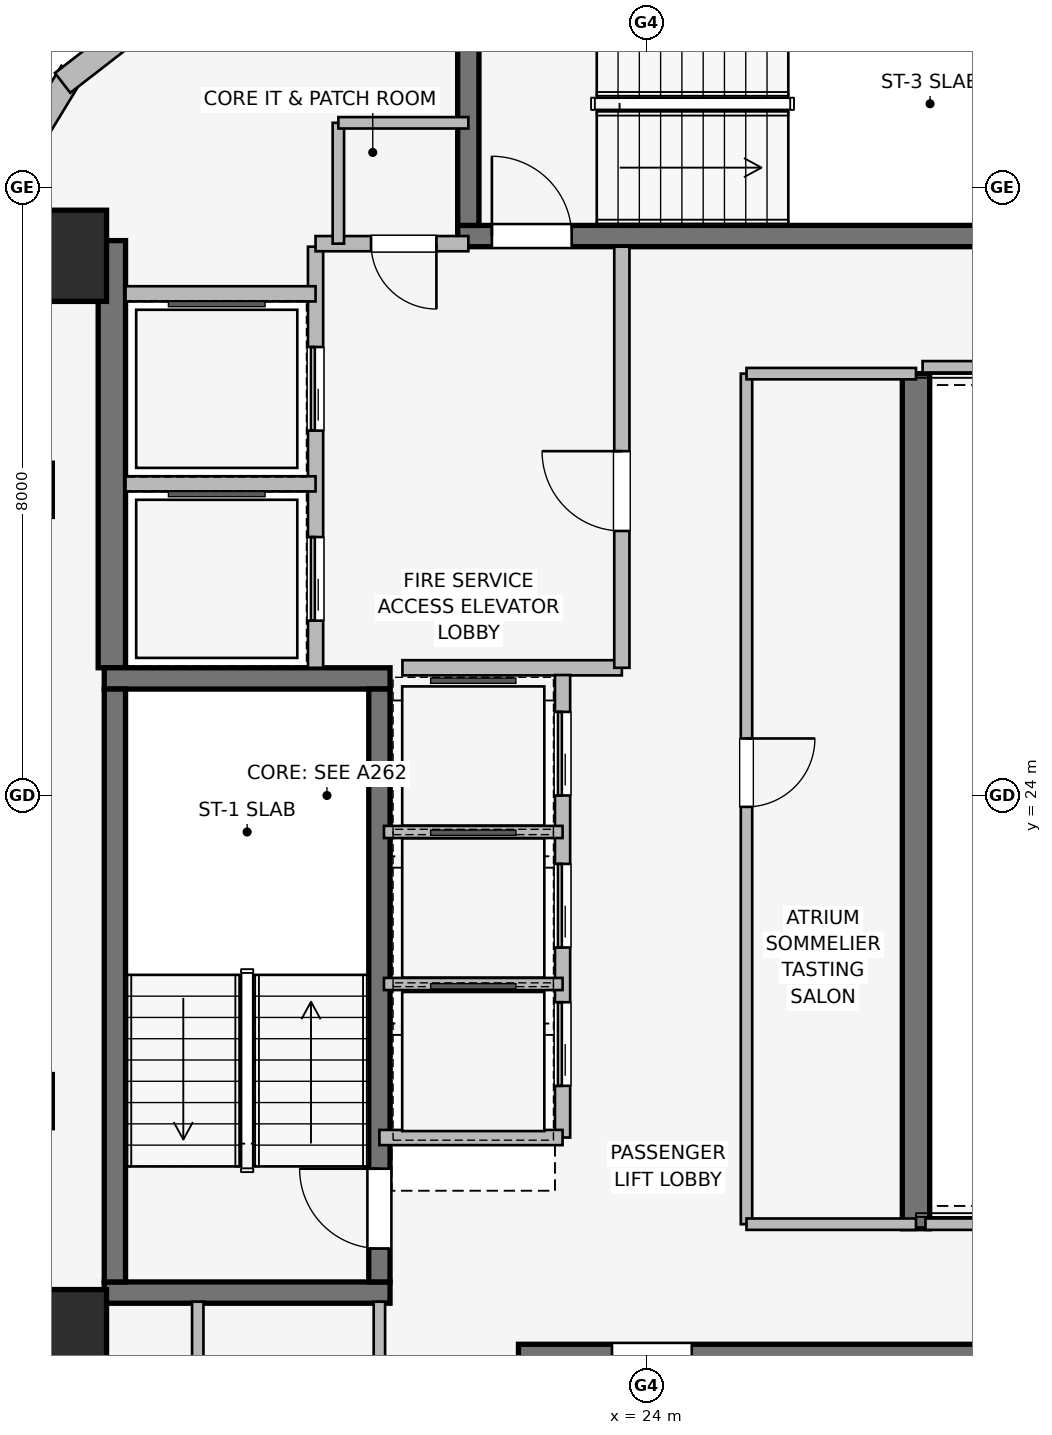
"""IFC4 building model, lengths in metres.
Left out: names, types, materials, properties, quantities, classifications, styles, units other than length and angle.
Written with IfcOpenShell. Run it as: python <this file> out.ifc"""

import sys

from ifc_helpers import new_model, si_unit, direction, frame, frame_2d, origin, origin_2d, place, context, subcontext, project, spatial, rectangle, extrude, element, fill, save


model = new_model("IFC4")
c1 = context("Model", 3, precision=1e-05, world=origin(), true_north=direction((0.0, 1.0)))
c2 = subcontext(c1, "Body", "Model", "MODEL_VIEW")
j1 = project(units=[si_unit("LENGTHUNIT", "METRE"), si_unit("PLANEANGLEUNIT", "RADIAN")], contexts=[c1])
p1 = place(None, origin())
s1 = spatial("IfcSite", under=j1, at=p1, CompositionType="ELEMENT")
p2 = place(p1, origin())
s2 = spatial("IfcBuilding", under=s1, at=p2, CompositionType="ELEMENT")
p3 = place(p2, frame((0.0, 0.0, 220.6)))
s3 = spatial("IfcBuildingStorey", under=s2, at=p3, CompositionType="ELEMENT", Elevation=220.6)
p4 = place(p3, frame((16.97, 25.68, 0.0), z_axis=(0.0, 0.0, 1.0), x_axis=(0.0, 1.0, 0.0)))
e1 = element("IfcWall", 1, at=p4, inside=s3, PredefinedType="SHEAR", context=c2, shape_type="SweptSolid", body=[
    extrude(rectangle(XDim=5.62, YDim=0.36, at=frame_2d((2.81, 0.0))), origin(), (0.0, 0.0, 1.0), 3.55),
])
p5 = place(p3, frame((27.55, 29.55, 0.0), z_axis=(0.0, 0.0, 1.0), x_axis=(0.0, -1.0, 0.0)))
e2 = element("IfcWall", 2, at=p5, inside=s3, PredefinedType="SHEAR", context=c2, shape_type="SweptSolid", body=[
    extrude(rectangle(XDim=11.25, YDim=0.36, at=frame_2d((5.625, 0.0))), origin(), (0.0, 0.0, 1.0), 3.55),
])
for number, where, z_axis, x_axis in (
    (3, (16.87, 17.46, 0.0), (0.0, 0.0, 1.0), (1.0, 0.0, 0.0)),
    (4, (20.63, 25.54, 0.0), (0.0, 0.0, 1.0), (-1.0, 0.0, 0.0)),
):
    element("IfcWall", number, at=place(p3, frame(where, z_axis=z_axis, x_axis=x_axis)), inside=s3, PredefinedType="SHEAR", context=c2, shape_type="SweptSolid", body=[
        extrude(rectangle(XDim=3.76, YDim=0.28, at=frame_2d((1.88, 0.0))), origin(), (0.0, 0.0, 1.0), 3.55),
    ])
p6 = place(p3, frame((17.01, 25.4, 0.0), z_axis=(0.0, 0.0, 1.0), x_axis=(0.0, -1.0, 0.0)))
e5 = element("IfcWall", 5, at=p6, inside=s3, PredefinedType="SHEAR", context=c2, shape_type="SweptSolid", body=[
    extrude(rectangle(XDim=7.8, YDim=0.28, at=frame_2d((3.9, 0.0))), origin(), (0.0, 0.0, 1.0), 3.55),
])
p7 = place(p3, frame((20.49, 17.6, 0.0), z_axis=(0.0, 0.0, 1.0), x_axis=(0.0, 1.0, 0.0)))
e6 = element("IfcWall", 6, at=p7, inside=s3, PredefinedType="SHEAR", context=c2, shape_type="SweptSolid", body=[
    extrude(rectangle(XDim=7.8, YDim=0.28, at=frame_2d((3.9, 0.0))), origin(), (0.0, 0.0, 1.0), 3.55),
])
p8 = place(p7, frame((0.44, 0.0, 0.0)))
e7 = element("IfcOpeningElement", 7, at=p8, cuts=e6, PredefinedType="OPENING", context=c2, shape_type="SweptSolid", body=[
    extrude(rectangle(XDim=1.05, YDim=2.0, at=frame_2d((0.525, 1.0))), frame((0.0, 0.15, 0.0), z_axis=(0.0, -1.0, 0.0), x_axis=(1.0, 0.0, 0.0)), (0.0, 0.0, 1.0), 0.3),
])
p9 = place(p3, frame((30.68, 16.64, 0.0), z_axis=(0.0, 0.0, 1.0), x_axis=(-1.0, 0.0, 0.0)))
e8 = element("IfcWall", 8, at=p9, inside=s3, PredefinedType="SHEAR", context=c2, shape_type="SweptSolid", body=[
    extrude(rectangle(XDim=8.36, YDim=0.28, at=frame_2d((4.18, 0.0))), origin(), (0.0, 0.0, 1.0), 3.55),
])
p10 = place(p9, frame((6.08, 0.0, 0.0)))
e9 = element("IfcOpeningElement", 9, at=p10, cuts=e8, PredefinedType="OPENING", context=c2, shape_type="SweptSolid", body=[
    extrude(rectangle(XDim=1.05, YDim=2.0, at=frame_2d((0.525, 1.0))), frame((0.0, 0.15, 0.0), z_axis=(0.0, -1.0, 0.0), x_axis=(1.0, 0.0, 0.0)), (0.0, 0.0, 1.0), 0.3),
])
p11 = place(p3, frame((21.52, 31.36, 0.0), z_axis=(0.0, 0.0, 1.0), x_axis=(1.0, 0.0, 0.0)))
e10 = element("IfcWall", 10, at=p11, inside=s3, PredefinedType="SHEAR", context=c2, shape_type="SweptSolid", body=[
    extrude(rectangle(XDim=8.36, YDim=0.28, at=frame_2d((4.18, 0.0))), origin(), (0.0, 0.0, 1.0), 3.55),
])
p12 = place(p11, frame((0.45, 0.0, 0.0)))
e11 = element("IfcOpeningElement", 11, at=p12, cuts=e10, PredefinedType="OPENING", context=c2, shape_type="SweptSolid", body=[
    extrude(rectangle(XDim=1.05, YDim=2.0, at=frame_2d((0.525, 1.0))), frame((0.0, 0.15, 0.0), z_axis=(0.0, -1.0, 0.0), x_axis=(1.0, 0.0, 0.0)), (0.0, 0.0, 1.0), 0.3),
])
p13 = place(p3, frame((21.66, 34.7, 0.0), z_axis=(0.0, 0.0, 1.0), x_axis=(0.0, -1.0, 0.0)))
e12 = element("IfcWall", 12, at=p13, inside=s3, PredefinedType="SHEAR", context=c2, shape_type="SweptSolid", body=[
    extrude(rectangle(XDim=3.2, YDim=0.28, at=frame_2d((1.6, 0.0))), origin(), (0.0, 0.0, 1.0), 3.55),
])
for number, where, z_axis, x_axis in (
    (13, (16.3, 16.9, 0.0), (0.0, 0.0, 1.0), (1.0, 0.0, 0.0)),
    (14, (16.3, 31.1, 0.0), (0.0, 0.0, 1.0), (1.0, 0.0, 0.0)),
):
    element("IfcColumn", number, at=place(p3, frame(where, z_axis=z_axis, x_axis=x_axis)), inside=s3, PredefinedType="COLUMN", context=c2, shape_type="SweptSolid", body=[
        extrude(rectangle(XDim=1.2, YDim=1.2, at=origin_2d()), origin(), (0.0, 0.0, 1.0), 3.55),
    ])
p14 = place(p3, frame((15.574, 32.082, 0.0), z_axis=(0.0, 0.0, 1.0), x_axis=(0.520325409202, 0.853968072318, 0.0)))
e15 = element("IfcWall", 15, at=p14, inside=s3, PredefinedType="STANDARD", context=c2, shape_type="SweptSolid", body=[
    extrude(rectangle(XDim=1.678, YDim=0.33, at=frame_2d((0.839, 0.0))), origin(), (0.0, 0.0, 1.0), 3.29),
])
p15 = place(p3, frame((16.322, 33.375, 0.0), z_axis=(0.0, 0.0, 1.0), x_axis=(0.790691856293, 0.61221433207, 0.0)))
e16 = element("IfcWall", 16, at=p15, inside=s3, PredefinedType="STANDARD", context=c2, shape_type="SweptSolid", body=[
    extrude(rectangle(XDim=1.676, YDim=0.33, at=frame_2d((0.838, 0.0))), origin(), (0.0, 0.0, 1.0), 3.29),
])
p16 = place(p3, frame((19.65, 25.68, 0.0), z_axis=(0.0, 0.0, 1.0), x_axis=(0.0, 1.0, 0.0)))
e17 = element("IfcWall", 17, at=p16, inside=s3, PredefinedType="PARTITIONING", context=c2, shape_type="SweptSolid", body=[
    extrude(rectangle(XDim=5.54, YDim=0.2, at=frame_2d((2.77, 0.0))), origin(), (0.0, 0.0, 1.0), 3.29),
])
p17 = place(p16, frame((0.62, 0.0, 0.0)))
e18 = element("IfcOpeningElement", 18, at=p17, cuts=e17, PredefinedType="OPENING", context=c2, shape_type="SweptSolid", body=[
    extrude(rectangle(XDim=1.1, YDim=2.2, at=frame_2d((0.55, 1.1))), frame((0.0, 0.11, 0.0), z_axis=(0.0, -1.0, 0.0), x_axis=(1.0, 0.0, 0.0)), (0.0, 0.0, 1.0), 0.22),
])
p18 = place(p16, frame((3.12, 0.0, 0.0)))
e19 = element("IfcOpeningElement", 19, at=p18, cuts=e17, PredefinedType="OPENING", context=c2, shape_type="SweptSolid", body=[
    extrude(rectangle(XDim=1.1, YDim=2.2, at=frame_2d((0.55, 1.1))), frame((0.0, 0.11, 0.0), z_axis=(0.0, -1.0, 0.0), x_axis=(1.0, 0.0, 0.0)), (0.0, 0.0, 1.0), 0.22),
])
p19 = place(p3, frame((20.793, 25.68, 0.0), z_axis=(0.0, 0.0, 1.0), x_axis=(1.0, 0.0, 0.0)))
e20 = element("IfcWall", 20, at=p19, inside=s3, PredefinedType="PARTITIONING", context=c2, shape_type="SweptSolid", body=[
    extrude(rectangle(XDim=2.887, YDim=0.2, at=frame_2d((1.443, 0.0))), origin(), (0.0, 0.0, 1.0), 3.29),
])
p20 = place(p3, frame((23.68, 25.68, 0.0), z_axis=(0.0, 0.0, 1.0), x_axis=(0.0, 1.0, 0.0)))
e21 = element("IfcWall", 21, at=p20, inside=s3, PredefinedType="PARTITIONING", context=c2, shape_type="SweptSolid", body=[
    extrude(rectangle(XDim=5.54, YDim=0.2, at=frame_2d((2.77, 0.0))), origin(), (0.0, 0.0, 1.0), 3.29),
])
p21 = place(p20, frame((1.8, 0.0, 0.0)))
e22 = element("IfcOpeningElement", 22, at=p21, cuts=e21, PredefinedType="OPENING", context=c2, shape_type="SweptSolid", body=[
    extrude(rectangle(XDim=1.05, YDim=2.0, at=frame_2d((0.525, 1.0))), frame((0.0, 0.11, 0.0), z_axis=(0.0, -1.0, 0.0), x_axis=(1.0, 0.0, 0.0)), (0.0, 0.0, 1.0), 0.22),
])
p22 = place(p3, frame((21.66, 31.26, 0.0), z_axis=(0.0, 0.0, 1.0), x_axis=(-1.0, 0.0, 0.0)))
e23 = element("IfcWall", 23, at=p22, inside=s3, PredefinedType="PARTITIONING", context=c2, shape_type="SweptSolid", body=[
    extrude(rectangle(XDim=2.01, YDim=0.2, at=frame_2d((1.005, 0.0))), origin(), (0.0, 0.0, 1.0), 3.29),
])
p23 = place(p22, frame((0.42, 0.0, 0.0)))
e24 = element("IfcOpeningElement", 24, at=p23, cuts=e23, PredefinedType="OPENING", context=c2, shape_type="SweptSolid", body=[
    extrude(rectangle(XDim=0.86, YDim=2.0, at=frame_2d((0.43, 1.0))), frame((0.0, 0.11, 0.0), z_axis=(0.0, -1.0, 0.0), x_axis=(1.0, 0.0, 0.0)), (0.0, 0.0, 1.0), 0.22),
])
p24 = place(p3, frame((17.15, 28.1, 0.0), z_axis=(0.0, 0.0, 1.0), x_axis=(1.0, 0.0, 0.0)))
e25 = element("IfcWall", 25, at=p24, inside=s3, PredefinedType="PARTITIONING", context=c2, shape_type="SweptSolid", body=[
    extrude(rectangle(XDim=2.5, YDim=0.2, at=frame_2d((1.25, 0.0))), origin(), (0.0, 0.0, 1.0), 3.29),
])
p25 = place(p3, frame((19.65, 30.6, 0.0), z_axis=(0.0, 0.0, 1.0), x_axis=(-1.0, 0.0, 0.0)))
e26 = element("IfcWall", 26, at=p25, inside=s3, PredefinedType="PARTITIONING", context=c2, shape_type="SweptSolid", body=[
    extrude(rectangle(XDim=2.5, YDim=0.2, at=frame_2d((1.25, 0.0))), origin(), (0.0, 0.0, 1.0), 2.19),
])
p26 = place(p3, frame((22.9, 19.5, 0.0), z_axis=(0.0, 0.0, 1.0), x_axis=(0.0, 1.0, 0.0)))
e27 = element("IfcWall", 27, at=p26, inside=s3, PredefinedType="PARTITIONING", context=c2, shape_type="SweptSolid", body=[
    extrude(rectangle(XDim=6.085, YDim=0.2, at=frame_2d((3.042, 0.0))), origin(), (0.0, 0.0, 1.0), 3.29),
])
p27 = place(p26, frame((0.68, 0.0, 0.0)))
e28 = element("IfcOpeningElement", 28, at=p27, cuts=e27, PredefinedType="OPENING", context=c2, shape_type="SweptSolid", body=[
    extrude(rectangle(XDim=1.1, YDim=2.2, at=frame_2d((0.55, 1.1))), frame((0.0, 0.11, 0.0), z_axis=(0.0, -1.0, 0.0), x_axis=(1.0, 0.0, 0.0)), (0.0, 0.0, 1.0), 0.22),
])
p28 = place(p26, frame((2.5, 0.0, 0.0)))
e29 = element("IfcOpeningElement", 29, at=p28, cuts=e27, PredefinedType="OPENING", context=c2, shape_type="SweptSolid", body=[
    extrude(rectangle(XDim=1.1, YDim=2.2, at=frame_2d((0.55, 1.1))), frame((0.0, 0.11, 0.0), z_axis=(0.0, -1.0, 0.0), x_axis=(1.0, 0.0, 0.0)), (0.0, 0.0, 1.0), 0.22),
])
p29 = place(p26, frame((4.5, 0.0, 0.0)))
e30 = element("IfcOpeningElement", 30, at=p29, cuts=e27, PredefinedType="OPENING", context=c2, shape_type="SweptSolid", body=[
    extrude(rectangle(XDim=1.1, YDim=2.2, at=frame_2d((0.55, 1.1))), frame((0.0, 0.11, 0.0), z_axis=(0.0, -1.0, 0.0), x_axis=(1.0, 0.0, 0.0)), (0.0, 0.0, 1.0), 0.22),
])
p30 = place(p3, frame((20.49, 19.5, 0.0), z_axis=(0.0, 0.0, 1.0), x_axis=(1.0, 0.0, 0.0)))
e31 = element("IfcWall", 31, at=p30, inside=s3, PredefinedType="PARTITIONING", context=c2, shape_type="SweptSolid", body=[
    extrude(rectangle(XDim=2.41, YDim=0.2, at=frame_2d((1.205, 0.0))), origin(), (0.0, 0.0, 1.0), 2.19),
])
for number, where, z_axis, x_axis in (
    (32, (20.55, 21.52, 0.0), (0.0, 0.0, 1.0), (1.0, 0.0, 0.0)),
    (33, (20.55, 23.52, 0.0), (0.0, 0.0, 1.0), (1.0, 0.0, 0.0)),
):
    element("IfcWall", number, at=place(p3, frame(where, z_axis=z_axis, x_axis=x_axis)), inside=s3, PredefinedType="PARTITIONING", context=c2, shape_type="SweptSolid", body=[
        extrude(rectangle(XDim=2.35, YDim=0.16, at=frame_2d((1.175, 0.0))), origin(), (0.0, 0.0, 1.0), 3.29),
    ])
p31 = place(p3, frame((25.32, 29.55, 0.0), z_axis=(0.0, 0.0, 1.0), x_axis=(0.0, -1.0, 0.0)))
e34 = element("IfcWall", 34, at=p31, inside=s3, PredefinedType="PARTITIONING", context=c2, shape_type="SweptSolid", body=[
    extrude(rectangle(XDim=11.19, YDim=0.15, at=frame_2d((5.595, 0.0))), origin(), (0.0, 0.0, 1.0), 3.29),
])
p32 = place(p31, frame((4.8, 0.0, 0.0)))
e35 = element("IfcOpeningElement", 35, at=p32, cuts=e34, PredefinedType="OPENING", context=c2, shape_type="SweptSolid", body=[
    extrude(rectangle(XDim=0.9, YDim=2.0, at=frame_2d((0.45, 1.0))), frame((0.0, 0.085, 0.0), z_axis=(0.0, -1.0, 0.0), x_axis=(1.0, 0.0, 0.0)), (0.0, 0.0, 1.0), 0.17),
])
p33 = place(p3, frame((25.32, 18.36, 0.0), z_axis=(0.0, 0.0, 1.0), x_axis=(1.0, 0.0, 0.0)))
e36 = element("IfcWall", 36, at=p33, inside=s3, PredefinedType="PARTITIONING", context=c2, shape_type="SweptSolid", body=[
    extrude(rectangle(XDim=2.23, YDim=0.15, at=frame_2d((1.115, 0.0))), origin(), (0.0, 0.0, 1.0), 3.29),
])
p34 = place(p3, frame((27.55, 29.55, 0.0), z_axis=(0.0, 0.0, 1.0), x_axis=(-1.0, 0.0, 0.0)))
e37 = element("IfcWall", 37, at=p34, inside=s3, PredefinedType="PARTITIONING", context=c2, shape_type="SweptSolid", body=[
    extrude(rectangle(XDim=2.23, YDim=0.15, at=frame_2d((1.115, 0.0))), origin(), (0.0, 0.0, 1.0), 2.19),
])
p35 = place(p3, frame((18.1, 17.34, 0.0), z_axis=(0.0, 0.0, 1.0), x_axis=(0.0, -1.0, 0.0)))
e38 = element("IfcWall", 38, at=p35, inside=s3, PredefinedType="PARTITIONING", context=c2, shape_type="SweptSolid", body=[
    extrude(rectangle(XDim=4.133, YDim=0.15, at=frame_2d((2.066, 0.0))), origin(), (0.0, 0.0, 1.0), 3.29),
])
p36 = place(p3, frame((20.49, 13.2, 0.0), z_axis=(0.0, 0.0, 1.0), x_axis=(0.0, 1.0, 0.0)))
e39 = element("IfcWall", 39, at=p36, inside=s3, PredefinedType="PARTITIONING", context=c2, shape_type="SweptSolid", body=[
    extrude(rectangle(XDim=4.14, YDim=0.15, at=frame_2d((2.07, 0.0))), origin(), (0.0, 0.0, 1.0), 3.29),
])
p37 = place(p36, frame((1.25, 0.0, 0.0)))
e40 = element("IfcOpeningElement", 40, at=p37, cuts=e39, PredefinedType="OPENING", context=c2, shape_type="SweptSolid", body=[
    extrude(rectangle(XDim=0.9, YDim=2.0, at=frame_2d((0.45, 1.0))), frame((0.0, 0.085, 0.0), z_axis=(0.0, -1.0, 0.0), x_axis=(1.0, 0.0, 0.0)), (0.0, 0.0, 1.0), 0.17),
])
p38 = place(p3, frame((19.95, 32.85, 0.0), z_axis=(0.0, 0.0, 1.0), x_axis=(0.0, -1.0, 0.0)))
e41 = element("IfcWall", 41, at=p38, inside=s3, PredefinedType="PARTITIONING", context=c2, shape_type="SweptSolid", body=[
    extrude(rectangle(XDim=1.59, YDim=0.15, at=frame_2d((0.795, 0.0))), origin(), (0.0, 0.0, 1.0), 3.29),
])
p39 = place(p3, frame((21.66, 32.85, 0.0), z_axis=(0.0, 0.0, 1.0), x_axis=(-1.0, 0.0, 0.0)))
e42 = element("IfcWall", 42, at=p39, inside=s3, PredefinedType="PARTITIONING", context=c2, shape_type="SweptSolid", body=[
    extrude(rectangle(XDim=1.71, YDim=0.15, at=frame_2d((0.855, 0.0))), origin(), (0.0, 0.0, 1.0), 3.29),
])
p40 = place(p3, frame((27.675, 18.36, 0.0), z_axis=(0.0, 0.0, 1.0), x_axis=(1.0, 0.0, 0.0)))
e43 = element("IfcWall", 43, at=p40, inside=s3, PredefinedType="PARTITIONING", context=c2, shape_type="SweptSolid", body=[
    extrude(rectangle(XDim=12.165, YDim=0.15, at=frame_2d((6.083, 0.0))), origin(), (0.0, 0.0, 1.0), 2.431),
])
p41 = place(p3, frame((39.84, 29.64, 0.0), z_axis=(0.0, 0.0, 1.0), x_axis=(-1.0, 0.0, 0.0)))
e44 = element("IfcWall", 44, at=p41, inside=s3, PredefinedType="PARTITIONING", context=c2, shape_type="SweptSolid", body=[
    extrude(rectangle(XDim=12.203, YDim=0.15, at=frame_2d((6.102, 0.0))), origin(), (0.0, 0.0, 1.0), 2.431),
])
p42 = place(p8, origin())
e45 = element("IfcDoor", 45, at=p42, inside=s3, OperationType="SINGLE_SWING_RIGHT", PredefinedType="DOOR", context=c2, shape_type="SweptSolid", body=[
    extrude(rectangle(XDim=1.05, YDim=2.0, at=frame_2d((0.525, 1.0))), frame((0.0, 0.025, 0.0), z_axis=(0.0, -1.0, 0.0), x_axis=(1.0, 0.0, 0.0)), (0.0, 0.0, 1.0), 0.05),
])
fill(e7, e45)
p43 = place(p10, origin())
e46 = element("IfcDoor", 46, at=p43, inside=s3, OperationType="SINGLE_SWING_RIGHT", PredefinedType="DOOR", context=c2, shape_type="SweptSolid", body=[
    extrude(rectangle(XDim=1.05, YDim=2.0, at=frame_2d((0.525, 1.0))), frame((0.0, 0.025, 0.0), z_axis=(0.0, -1.0, 0.0), x_axis=(1.0, 0.0, 0.0)), (0.0, 0.0, 1.0), 0.05),
])
fill(e9, e46)
p44 = place(p12, origin())
e47 = element("IfcDoor", 47, at=p44, inside=s3, OperationType="SINGLE_SWING_LEFT", PredefinedType="DOOR", context=c2, shape_type="SweptSolid", body=[
    extrude(rectangle(XDim=1.05, YDim=2.0, at=frame_2d((0.525, 1.0))), frame((0.0, 0.025, 0.0), z_axis=(0.0, -1.0, 0.0), x_axis=(1.0, 0.0, 0.0)), (0.0, 0.0, 1.0), 0.05),
])
fill(e11, e47)
p45 = place(p17, origin())
e48 = element("IfcDoor", 48, at=p45, inside=s3, OperationType="SLIDING_TO_LEFT", PredefinedType="DOOR", context=c2, shape_type="SweptSolid", body=[
    extrude(rectangle(XDim=1.1, YDim=2.2, at=frame_2d((0.55, 1.1))), frame((0.0, 0.025, 0.0), z_axis=(0.0, -1.0, 0.0), x_axis=(1.0, 0.0, 0.0)), (0.0, 0.0, 1.0), 0.05),
])
fill(e18, e48)
p46 = place(p18, origin())
e49 = element("IfcDoor", 49, at=p46, inside=s3, OperationType="SLIDING_TO_LEFT", PredefinedType="DOOR", context=c2, shape_type="SweptSolid", body=[
    extrude(rectangle(XDim=1.1, YDim=2.2, at=frame_2d((0.55, 1.1))), frame((0.0, 0.025, 0.0), z_axis=(0.0, -1.0, 0.0), x_axis=(1.0, 0.0, 0.0)), (0.0, 0.0, 1.0), 0.05),
])
fill(e19, e49)
p47 = place(p21, origin())
e50 = element("IfcDoor", 50, at=p47, inside=s3, OperationType="SINGLE_SWING_RIGHT", PredefinedType="DOOR", context=c2, shape_type="SweptSolid", body=[
    extrude(rectangle(XDim=1.05, YDim=2.0, at=frame_2d((0.525, 1.0))), frame((0.0, 0.025, 0.0), z_axis=(0.0, -1.0, 0.0), x_axis=(1.0, 0.0, 0.0)), (0.0, 0.0, 1.0), 0.05),
])
fill(e22, e50)
p48 = place(p23, origin())
e51 = element("IfcDoor", 51, at=p48, inside=s3, OperationType="SINGLE_SWING_LEFT", PredefinedType="DOOR", context=c2, shape_type="SweptSolid", body=[
    extrude(rectangle(XDim=0.86, YDim=2.0, at=frame_2d((0.43, 1.0))), frame((0.0, 0.025, 0.0), z_axis=(0.0, -1.0, 0.0), x_axis=(1.0, 0.0, 0.0)), (0.0, 0.0, 1.0), 0.05),
])
fill(e24, e51)
p49 = place(p27, origin())
e52 = element("IfcDoor", 52, at=p49, inside=s3, OperationType="SLIDING_TO_LEFT", PredefinedType="DOOR", context=c2, shape_type="SweptSolid", body=[
    extrude(rectangle(XDim=1.1, YDim=2.2, at=frame_2d((0.55, 1.1))), frame((0.0, 0.025, 0.0), z_axis=(0.0, -1.0, 0.0), x_axis=(1.0, 0.0, 0.0)), (0.0, 0.0, 1.0), 0.05),
])
fill(e28, e52)
p50 = place(p28, origin())
e53 = element("IfcDoor", 53, at=p50, inside=s3, OperationType="SLIDING_TO_LEFT", PredefinedType="DOOR", context=c2, shape_type="SweptSolid", body=[
    extrude(rectangle(XDim=1.1, YDim=2.2, at=frame_2d((0.55, 1.1))), frame((0.0, 0.025, 0.0), z_axis=(0.0, -1.0, 0.0), x_axis=(1.0, 0.0, 0.0)), (0.0, 0.0, 1.0), 0.05),
])
fill(e29, e53)
p51 = place(p29, origin())
e54 = element("IfcDoor", 54, at=p51, inside=s3, OperationType="SLIDING_TO_LEFT", PredefinedType="DOOR", context=c2, shape_type="SweptSolid", body=[
    extrude(rectangle(XDim=1.1, YDim=2.2, at=frame_2d((0.55, 1.1))), frame((0.0, 0.025, 0.0), z_axis=(0.0, -1.0, 0.0), x_axis=(1.0, 0.0, 0.0)), (0.0, 0.0, 1.0), 0.05),
])
fill(e30, e54)
p52 = place(p32, origin())
e55 = element("IfcDoor", 55, at=p52, inside=s3, OperationType="SINGLE_SWING_LEFT", PredefinedType="DOOR", context=c2, shape_type="SweptSolid", body=[
    extrude(rectangle(XDim=0.9, YDim=2.0, at=frame_2d((0.45, 1.0))), frame((0.0, 0.025, 0.0), z_axis=(0.0, -1.0, 0.0), x_axis=(1.0, 0.0, 0.0)), (0.0, 0.0, 1.0), 0.05),
])
fill(e35, e55)
save(model, sys.argv[1])
